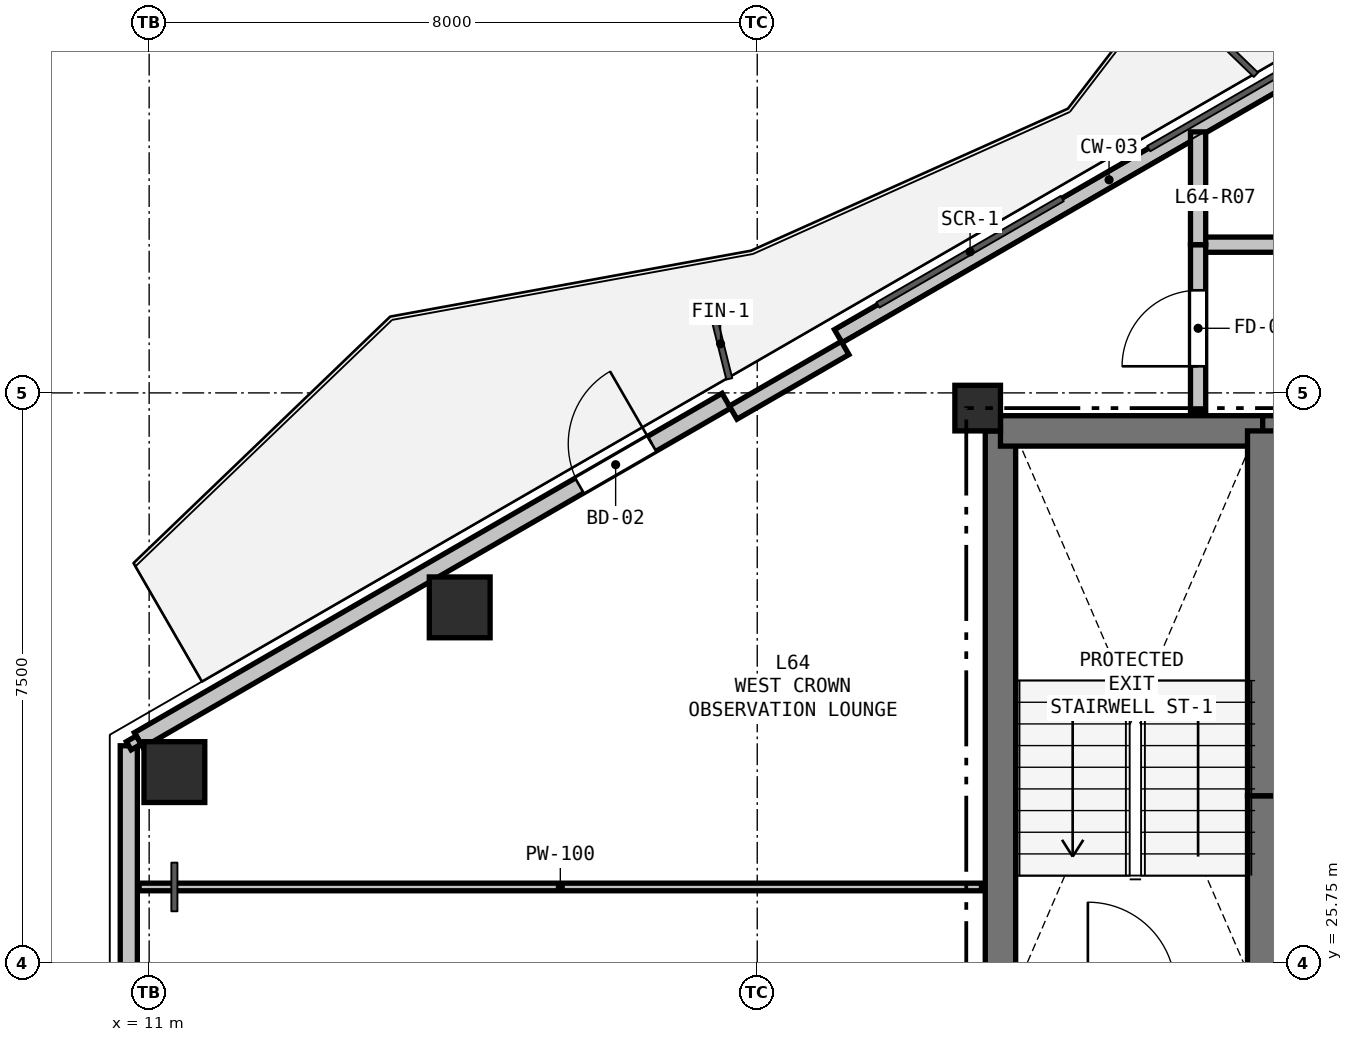
"""IFC4 building model, lengths in metres.
Left out: names, types, materials, properties, quantities, classifications, styles, units other than length and angle.
Written with IfcOpenShell. Run it as: python <this file> out.ifc"""

import sys

from ifc_helpers import new_model, si_unit, direction, frame, frame_2d, origin, origin_2d, place, context, subcontext, project, spatial, rectangle, hollow_rectangle, extrude, element, fill, save


model = new_model("IFC4")
c1 = context("Model", 3, precision=1e-05, world=origin(), true_north=direction((0.0, 1.0)))
c2 = subcontext(c1, "Body", "Model", "MODEL_VIEW")
j1 = project(units=[si_unit("LENGTHUNIT", "METRE"), si_unit("PLANEANGLEUNIT", "RADIAN")], contexts=[c1])
p1 = place(None, origin())
s1 = spatial("IfcSite", under=j1, at=p1, CompositionType="ELEMENT")
p2 = place(p1, origin())
s2 = spatial("IfcBuilding", under=s1, at=p2, CompositionType="ELEMENT")
p3 = place(p2, frame((0.0, 0.0, 229.8)))
s3 = spatial("IfcBuildingStorey", under=s2, at=p3, CompositionType="ELEMENT", Elevation=229.8)
p4 = place(p3, frame((21.9, 33.05, 0.0), z_axis=(0.0, 0.0, 1.0), x_axis=(1.0, 0.0, 0.0)))
e1 = element("IfcColumn", 1, at=p4, inside=s3, PredefinedType="COLUMN", context=c2, shape_type="SweptSolid", body=[
    extrude(rectangle(XDim=0.6, YDim=0.6, at=origin_2d()), origin(), (0.0, 0.0, 1.0), 3.3),
])
for number, where, z_axis, x_axis in (
    (2, (11.332, 28.261, 0.0), (0.0, 0.0, 1.0), (1.0, 0.0, 0.0)),
    (3, (15.086, 30.428, 0.0), (0.0, 0.0, 1.0), (1.0, 0.0, 0.0)),
):
    element("IfcColumn", number, at=place(p3, frame(where, z_axis=z_axis, x_axis=x_axis)), inside=s3, PredefinedType="COLUMN", context=c2, shape_type="SweptSolid", body=[
        extrude(hollow_rectangle(XDim=0.8, YDim=0.8, WallThickness=0.025, at=origin_2d()), origin(), (0.0, 0.0, 1.0), 3.3),
    ])
p5 = place(p3, frame((10.732, 24.892, 0.0), z_axis=(0.0, 0.0, 1.0), x_axis=(0.0, 1.0, 0.0)))
e4 = element("IfcWall", 4, at=p5, inside=s3, PredefinedType="SOLIDWALL", context=c2, shape_type="SweptSolid", body=[
    extrude(rectangle(XDim=3.715, YDim=0.225, at=frame_2d((1.858, 0.0))), origin(), (0.0, 0.0, 1.0), 2.7),
])
p6 = place(p3, frame((10.862, 28.683, 0.0), z_axis=(0.0, 0.0, 1.0), x_axis=(0.866026655105, 0.499997832642, 0.0)))
e5 = element("IfcWall", 5, at=p6, inside=s3, PredefinedType="SOLIDWALL", context=c2, shape_type="SweptSolid", body=[
    extrude(rectangle(XDim=8.928, YDim=0.225, at=frame_2d((4.464, 0.0))), origin(), (0.0, 0.0, 1.0), 2.7),
])
p7 = place(p6, frame((6.696, 0.0, 0.0)))
e6 = element("IfcOpeningElement", 6, at=p7, cuts=e5, PredefinedType="OPENING", context=c2, shape_type="SweptSolid", body=[
    extrude(rectangle(XDim=1.1, YDim=2.1, at=frame_2d((0.55, 1.05))), frame((0.0, 0.123, 0.0), z_axis=(0.0, -1.0, 0.0), x_axis=(1.0, 0.0, 0.0)), (0.0, 0.0, 1.0), 0.245),
])
p8 = place(p3, frame((20.066, 33.997, 0.0), z_axis=(0.0, 0.0, 1.0), x_axis=(0.866019557082, 0.500010126649, 0.0)))
e7 = element("IfcWall", 7, at=p8, inside=s3, PredefinedType="PARAPET", context=c2, shape_type="SweptSolid", body=[
    extrude(rectangle(XDim=8.228, YDim=0.2, at=frame_2d((4.114, 0.0))), origin(), (0.0, 0.0, 1.0), 0.2),
])
p9 = place(p3, frame((18.684, 32.991, 0.0), z_axis=(0.0, 0.0, 1.0), x_axis=(0.866025371046, 0.500000056704, 0.0)))
e8 = element("IfcWall", 8, at=p9, inside=s3, PredefinedType="PARAPET", context=c2, shape_type="SweptSolid", body=[
    extrude(rectangle(XDim=1.7, YDim=0.2, at=frame_2d((0.85, 0.0))), origin(), (0.0, 0.0, 1.0), 2.7),
])
p10 = place(p3, frame((22.2, 25.4, 0.0), z_axis=(0.0, 0.0, 1.0), x_axis=(0.0, 1.0, 0.0)))
e9 = element("IfcWall", 9, at=p10, inside=s3, PredefinedType="SHEAR", context=c2, shape_type="SweptSolid", body=[
    extrude(rectangle(XDim=7.35, YDim=0.4, at=frame_2d((3.675, 0.0))), origin(), (0.0, 0.0, 1.0), 3.08),
])
p11 = place(p3, frame((22.2, 32.75, 0.0), z_axis=(0.0, 0.0, 1.0), x_axis=(1.0, 0.0, 0.0)))
e10 = element("IfcWall", 10, at=p11, inside=s3, PredefinedType="SHEAR", context=c2, shape_type="SweptSolid", body=[
    extrude(rectangle(XDim=3.45, YDim=0.4, at=frame_2d((1.725, 0.0))), origin(), (0.0, 0.0, 1.0), 3.08),
])
p12 = place(p3, frame((25.65, 32.75, 0.0), z_axis=(0.0, 0.0, 1.0), x_axis=(1.0, 0.0, 0.0)))
e11 = element("IfcWall", 11, at=p12, inside=s3, PredefinedType="SHEAR", context=c2, shape_type="SweptSolid", body=[
    extrude(rectangle(XDim=1.75, YDim=0.4, at=frame_2d((0.875, 0.0))), origin(), (0.0, 0.0, 1.0), 3.08),
])
p13 = place(p12, frame((0.375, 0.0, 0.0)))
e12 = element("IfcOpeningElement", 12, at=p13, cuts=e11, PredefinedType="OPENING", context=c2, shape_type="SweptSolid", body=[
    extrude(rectangle(XDim=1.0, YDim=2.15, at=frame_2d((0.5, 1.075))), frame((0.0, 0.21, 0.0), z_axis=(0.0, -1.0, 0.0), x_axis=(1.0, 0.0, 0.0)), (0.0, 0.0, 1.0), 0.42),
])
p14 = place(p3, frame((25.65, 25.55, 0.0), z_axis=(0.0, 0.0, 1.0), x_axis=(0.0, 1.0, 0.0)))
e13 = element("IfcWall", 13, at=p14, inside=s3, PredefinedType="SHEAR", context=c2, shape_type="SweptSolid", body=[
    extrude(rectangle(XDim=2.4, YDim=0.4, at=frame_2d((1.2, 0.0))), origin(), (0.0, 0.0, 1.0), 3.08),
])
p15 = place(p3, frame((25.65, 27.95, 0.0), z_axis=(0.0, 0.0, 1.0), x_axis=(0.0, 1.0, 0.0)))
e14 = element("IfcWall", 14, at=p15, inside=s3, PredefinedType="SHEAR", context=c2, shape_type="SweptSolid", body=[
    extrude(rectangle(XDim=4.8, YDim=0.4, at=frame_2d((2.4, 0.0))), origin(), (0.0, 0.0, 1.0), 3.08),
])
p16 = place(p3, frame((24.8, 35.2, 0.0), z_axis=(0.0, 0.0, 1.0), x_axis=(1.0, 0.0, 0.0)))
e15 = element("IfcWall", 15, at=p16, inside=s3, PredefinedType="PARTITIONING", context=c2, shape_type="SweptSolid", body=[
    extrude(rectangle(XDim=2.0, YDim=0.2, at=frame_2d((1.0, 0.0))), origin(), (0.0, 0.0, 1.0), 3.08),
])
p17 = place(p3, frame((24.8, 33.0, 0.0), z_axis=(0.0, 0.0, 1.0), x_axis=(0.0, 1.0, 0.0)))
e16 = element("IfcWall", 16, at=p17, inside=s3, PredefinedType="PARTITIONING", context=c2, shape_type="SweptSolid", body=[
    extrude(rectangle(XDim=2.2, YDim=0.2, at=frame_2d((1.1, 0.0))), origin(), (0.0, 0.0, 1.0), 2.605),
])
p18 = place(p17, frame((0.6, 0.0, 0.0)))
e17 = element("IfcOpeningElement", 17, at=p18, cuts=e16, PredefinedType="OPENING", context=c2, shape_type="SweptSolid", body=[
    extrude(rectangle(XDim=1.0, YDim=2.15, at=frame_2d((0.5, 1.075))), frame((0.0, 0.11, 0.0), z_axis=(0.0, -1.0, 0.0), x_axis=(1.0, 0.0, 0.0)), (0.0, 0.0, 1.0), 0.22),
])
p19 = place(p3, frame((24.8, 35.2, 0.0), z_axis=(0.0, 0.0, 1.0), x_axis=(0.0, 1.0, 0.0)))
e18 = element("IfcWall", 18, at=p19, inside=s3, PredefinedType="PARTITIONING", context=c2, shape_type="SweptSolid", body=[
    extrude(rectangle(XDim=1.484, YDim=0.2, at=frame_2d((0.742, 0.0))), origin(), (0.0, 0.0, 1.0), 2.365),
])
p20 = place(p3, frame((21.95, 26.75, 0.0), z_axis=(0.0, 0.0, 1.0), x_axis=(-1.0, 0.0, 0.0)))
e19 = element("IfcWall", 19, at=p20, inside=s3, PredefinedType="PARTITIONING", context=c2, shape_type="SweptSolid", body=[
    extrude(rectangle(XDim=11.082, YDim=0.1, at=frame_2d((5.541, 0.0))), origin(), (0.0, 0.0, 1.0), 2.605),
])
p21 = place(p3, frame((10.732, 28.608, 0.0), z_axis=(0.0, 0.0, 1.0), x_axis=(0.866131372301, 0.499816412211, 0.0)))
e20 = element("IfcWall", 20, at=p21, inside=s3, PredefinedType="PARTITIONING", context=c2, shape_type="SweptSolid", body=[
    extrude(rectangle(XDim=0.15, YDim=0.125, at=frame_2d((0.075, 0.0))), origin(), (0.0, 0.0, 1.0), 3.08),
])
p22 = place(p7, origin())
e21 = element("IfcDoor", 21, at=p22, inside=s3, OperationType="SINGLE_SWING_RIGHT", PredefinedType="DOOR", context=c2, shape_type="SweptSolid", body=[
    extrude(rectangle(XDim=1.1, YDim=2.1, at=frame_2d((0.55, 1.05))), frame((0.0, 0.025, 0.0), z_axis=(0.0, -1.0, 0.0), x_axis=(1.0, 0.0, 0.0)), (0.0, 0.0, 1.0), 0.05),
])
fill(e6, e21)
p23 = place(p18, origin())
e22 = element("IfcDoor", 22, at=p23, inside=s3, OperationType="SINGLE_SWING_LEFT", PredefinedType="DOOR", context=c2, shape_type="SweptSolid", body=[
    extrude(rectangle(XDim=1.0, YDim=2.15, at=frame_2d((0.5, 1.075))), frame((0.0, 0.025, 0.0), z_axis=(0.0, -1.0, 0.0), x_axis=(1.0, 0.0, 0.0)), (0.0, 0.0, 1.0), 0.05),
])
fill(e17, e22)
save(model, sys.argv[1])
